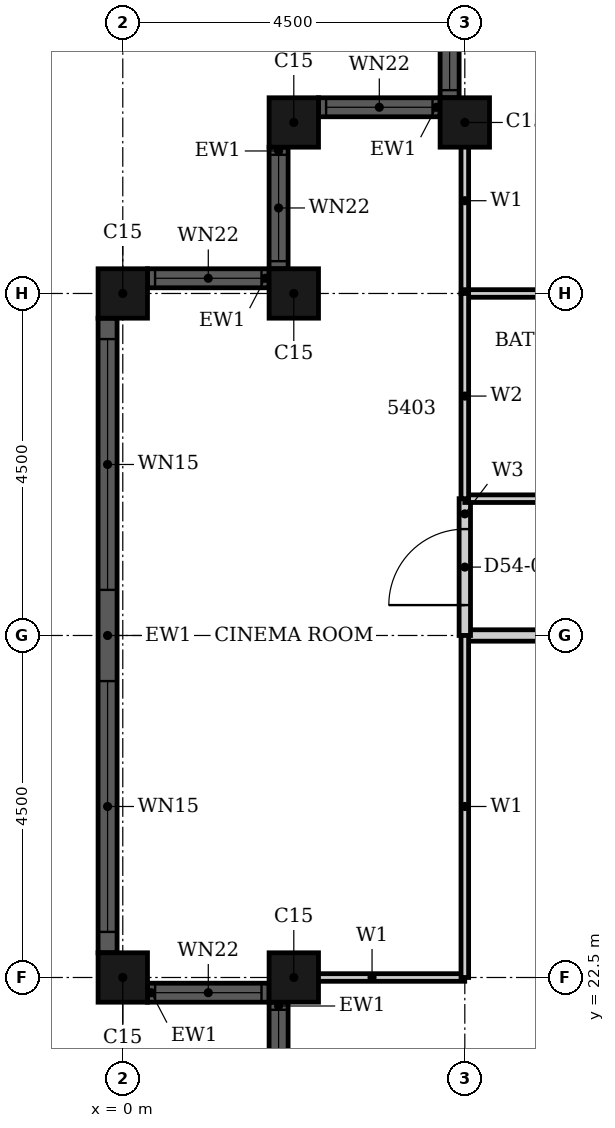
"""IFC4 building model, lengths in metres.
Left out: names, types, materials, properties, quantities, classifications, styles, units other than length and angle.
Written with IfcOpenShell. Run it as: python <this file> out.ifc"""

import sys

from ifc_helpers import new_model, si_unit, direction, frame, frame_2d, origin, origin_2d, place, context, subcontext, project, spatial, rectangle, hollow_rectangle, extrude, element, fill, save


model = new_model("IFC4")
c1 = context("Model", 3, precision=1e-05, world=origin(), true_north=direction((0.0, 1.0)))
c2 = subcontext(c1, "Body", "Model", "MODEL_VIEW")
j1 = project(units=[si_unit("LENGTHUNIT", "METRE"), si_unit("PLANEANGLEUNIT", "RADIAN")], contexts=[c1])
p1 = place(None, origin())
s1 = spatial("IfcSite", under=j1, at=p1, CompositionType="ELEMENT")
p2 = place(p1, origin())
s2 = spatial("IfcBuilding", under=s1, at=p2, CompositionType="ELEMENT")
p3 = place(p2, frame((0.0, 0.0, 214.6)))
s3 = spatial("IfcBuildingStorey", under=s2, at=p3, CompositionType="ELEMENT", Elevation=214.6)
for number, where, z_axis, x_axis in (
    (1, (4.5, 33.75, 0.0), (0.0, 0.0, 1.0), (1.0, 0.0, 0.0)),
    (2, (2.25, 33.75, 0.0), (0.0, 0.0, 1.0), (1.0, 0.0, 0.0)),
    (3, (2.25, 31.5, 0.0), (0.0, 0.0, 1.0), (1.0, 0.0, 0.0)),
    (4, (0.0, 31.5, 0.0), (0.0, 0.0, 1.0), (1.0, 0.0, 0.0)),
    (5, (0.0, 22.5, 0.0), (0.0, 0.0, 1.0), (1.0, 0.0, 0.0)),
    (6, (2.25, 22.5, 0.0), (0.0, 0.0, 1.0), (1.0, 0.0, 0.0)),
):
    element("IfcColumn", number, at=place(p3, frame(where, z_axis=z_axis, x_axis=x_axis)), inside=s3, PredefinedType="COLUMN", context=c2, shape_type="SweptSolid", body=[
        extrude(hollow_rectangle(XDim=0.65, YDim=0.65, WallThickness=0.021, at=origin_2d()), origin(), (0.0, 0.0, 1.0), 3.7),
    ])
p4 = place(p3, frame((4.3, 35.675, 0.0), z_axis=(0.0, 0.0, 1.0), x_axis=(0.0, -1.0, 0.0)))
e7 = element("IfcWall", 7, at=p4, inside=s3, PredefinedType="SOLIDWALL", context=c2, shape_type="SweptSolid", body=[
    extrude(rectangle(XDim=1.6, YDim=0.25, at=frame_2d((0.8, 0.0))), origin(), (0.0, 0.0, 1.0), 3.7),
])
p5 = place(p4, frame((0.1, 0.0, 0.9)))
e8 = element("IfcOpeningElement", 8, at=p5, cuts=e7, PredefinedType="OPENING", context=c2, shape_type="SweptSolid", body=[
    extrude(rectangle(XDim=1.4, YDim=1.85, at=frame_2d((0.7, 0.925))), frame((0.0, 0.135, 0.0), z_axis=(0.0, -1.0, 0.0), x_axis=(1.0, 0.0, 0.0)), (0.0, 0.0, 1.0), 0.27),
])
p6 = place(p3, frame((4.175, 33.95, 0.0), z_axis=(0.0, 0.0, 1.0), x_axis=(-1.0, 0.0, 0.0)))
e9 = element("IfcWall", 9, at=p6, inside=s3, PredefinedType="SOLIDWALL", context=c2, shape_type="SweptSolid", body=[
    extrude(rectangle(XDim=1.6, YDim=0.25, at=frame_2d((0.8, 0.0))), origin(), (0.0, 0.0, 1.0), 3.7),
])
p7 = place(p6, frame((0.1, 0.0, 0.9)))
e10 = element("IfcOpeningElement", 10, at=p7, cuts=e9, PredefinedType="OPENING", context=c2, shape_type="SweptSolid", body=[
    extrude(rectangle(XDim=1.4, YDim=1.85, at=frame_2d((0.7, 0.925))), frame((0.0, 0.135, 0.0), z_axis=(0.0, -1.0, 0.0), x_axis=(1.0, 0.0, 0.0)), (0.0, 0.0, 1.0), 0.27),
])
p8 = place(p3, frame((2.05, 33.425, 0.0), z_axis=(0.0, 0.0, 1.0), x_axis=(0.0, -1.0, 0.0)))
e11 = element("IfcWall", 11, at=p8, inside=s3, PredefinedType="SOLIDWALL", context=c2, shape_type="SweptSolid", body=[
    extrude(rectangle(XDim=1.6, YDim=0.25, at=frame_2d((0.8, 0.0))), origin(), (0.0, 0.0, 1.0), 3.7),
])
p9 = place(p8, frame((0.1, 0.0, 0.9)))
e12 = element("IfcOpeningElement", 12, at=p9, cuts=e11, PredefinedType="OPENING", context=c2, shape_type="SweptSolid", body=[
    extrude(rectangle(XDim=1.4, YDim=1.85, at=frame_2d((0.7, 0.925))), frame((0.0, 0.135, 0.0), z_axis=(0.0, -1.0, 0.0), x_axis=(1.0, 0.0, 0.0)), (0.0, 0.0, 1.0), 0.27),
])
p10 = place(p3, frame((1.925, 31.7, 0.0), z_axis=(0.0, 0.0, 1.0), x_axis=(-1.0, 0.0, 0.0)))
e13 = element("IfcWall", 13, at=p10, inside=s3, PredefinedType="SOLIDWALL", context=c2, shape_type="SweptSolid", body=[
    extrude(rectangle(XDim=1.6, YDim=0.25, at=frame_2d((0.8, 0.0))), origin(), (0.0, 0.0, 1.0), 3.7),
])
p11 = place(p10, frame((0.1, 0.0, 0.9)))
e14 = element("IfcOpeningElement", 14, at=p11, cuts=e13, PredefinedType="OPENING", context=c2, shape_type="SweptSolid", body=[
    extrude(rectangle(XDim=1.4, YDim=1.85, at=frame_2d((0.7, 0.925))), frame((0.0, 0.135, 0.0), z_axis=(0.0, -1.0, 0.0), x_axis=(1.0, 0.0, 0.0)), (0.0, 0.0, 1.0), 0.27),
])
p12 = place(p3, frame((-0.2, 31.175, 0.0), z_axis=(0.0, 0.0, 1.0), x_axis=(0.0, -1.0, 0.0)))
e15 = element("IfcWall", 15, at=p12, inside=s3, PredefinedType="SOLIDWALL", context=c2, shape_type="SweptSolid", body=[
    extrude(rectangle(XDim=8.35, YDim=0.25, at=frame_2d((4.175, 0.0))), origin(), (0.0, 0.0, 1.0), 3.7),
])
p13 = place(p12, frame((0.275, 0.0, 0.45)))
e16 = element("IfcOpeningElement", 16, at=p13, cuts=e15, PredefinedType="OPENING", context=c2, shape_type="SweptSolid", body=[
    extrude(rectangle(XDim=3.3, YDim=2.3, at=frame_2d((1.65, 1.15))), frame((0.0, 0.135, 0.0), z_axis=(0.0, -1.0, 0.0), x_axis=(1.0, 0.0, 0.0)), (0.0, 0.0, 1.0), 0.27),
])
p14 = place(p12, frame((4.775, 0.0, 0.45)))
e17 = element("IfcOpeningElement", 17, at=p14, cuts=e15, PredefinedType="OPENING", context=c2, shape_type="SweptSolid", body=[
    extrude(rectangle(XDim=3.3, YDim=2.3, at=frame_2d((1.65, 1.15))), frame((0.0, 0.135, 0.0), z_axis=(0.0, -1.0, 0.0), x_axis=(1.0, 0.0, 0.0)), (0.0, 0.0, 1.0), 0.27),
])
p15 = place(p3, frame((0.325, 22.3, 0.0), z_axis=(0.0, 0.0, 1.0), x_axis=(1.0, 0.0, 0.0)))
e18 = element("IfcWall", 18, at=p15, inside=s3, PredefinedType="SOLIDWALL", context=c2, shape_type="SweptSolid", body=[
    extrude(rectangle(XDim=1.6, YDim=0.25, at=frame_2d((0.8, 0.0))), origin(), (0.0, 0.0, 1.0), 3.7),
])
p16 = place(p15, frame((0.1, 0.0, 0.9)))
e19 = element("IfcOpeningElement", 19, at=p16, cuts=e18, PredefinedType="OPENING", context=c2, shape_type="SweptSolid", body=[
    extrude(rectangle(XDim=1.4, YDim=1.85, at=frame_2d((0.7, 0.925))), frame((0.0, 0.135, 0.0), z_axis=(0.0, -1.0, 0.0), x_axis=(1.0, 0.0, 0.0)), (0.0, 0.0, 1.0), 0.27),
])
p17 = place(p3, frame((2.05, 22.175, 0.0), z_axis=(0.0, 0.0, 1.0), x_axis=(0.0, -1.0, 0.0)))
e20 = element("IfcWall", 20, at=p17, inside=s3, PredefinedType="SOLIDWALL", context=c2, shape_type="SweptSolid", body=[
    extrude(rectangle(XDim=1.6, YDim=0.25, at=frame_2d((0.8, 0.0))), origin(), (0.0, 0.0, 1.0), 3.7),
])
p18 = place(p17, frame((0.1, 0.0, 0.9)))
e21 = element("IfcOpeningElement", 21, at=p18, cuts=e20, PredefinedType="OPENING", context=c2, shape_type="SweptSolid", body=[
    extrude(rectangle(XDim=1.4, YDim=1.85, at=frame_2d((0.7, 0.925))), frame((0.0, 0.135, 0.0), z_axis=(0.0, -1.0, 0.0), x_axis=(1.0, 0.0, 0.0)), (0.0, 0.0, 1.0), 0.27),
])
p19 = place(p3, frame((4.5, 27.0, 0.0), z_axis=(0.0, 0.0, 1.0), x_axis=(1.0, 0.0, 0.0)))
e22 = element("IfcWall", 22, at=p19, inside=s3, PredefinedType="PARTITIONING", context=c2, shape_type="SweptSolid", body=[
    extrude(rectangle(XDim=13.5, YDim=0.15, at=frame_2d((6.75, 0.0))), origin(), (0.0, 0.0, 1.0), 2.68),
])
p20 = place(p19, frame((5.35, 0.0, 0.0)))
e23 = element("IfcOpeningElement", 23, at=p20, cuts=e22, PredefinedType="OPENING", context=c2, shape_type="SweptSolid", body=[
    extrude(rectangle(XDim=1.0, YDim=2.1, at=frame_2d((0.5, 1.05))), frame((0.0, 0.085, 0.0), z_axis=(0.0, -1.0, 0.0), x_axis=(1.0, 0.0, 0.0)), (0.0, 0.0, 1.0), 0.17),
])
p21 = place(p3, frame((4.5, 27.0, 0.0), z_axis=(0.0, 0.0, 1.0), x_axis=(0.0, 1.0, 0.0)))
e24 = element("IfcWall", 24, at=p21, inside=s3, PredefinedType="PARTITIONING", context=c2, shape_type="SweptSolid", body=[
    extrude(rectangle(XDim=1.8, YDim=0.15, at=frame_2d((0.9, 0.0))), origin(), (0.0, 0.0, 1.0), 3.4),
])
p22 = place(p21, frame((0.4, 0.0, 0.0)))
e25 = element("IfcOpeningElement", 25, at=p22, cuts=e24, PredefinedType="OPENING", context=c2, shape_type="SweptSolid", body=[
    extrude(rectangle(XDim=1.0, YDim=2.1, at=frame_2d((0.5, 1.05))), frame((0.0, 0.085, 0.0), z_axis=(0.0, -1.0, 0.0), x_axis=(1.0, 0.0, 0.0)), (0.0, 0.0, 1.0), 0.17),
])
p23 = place(p3, frame((2.06, 22.5, 0.0), z_axis=(0.0, 0.0, 1.0), x_axis=(1.0, 0.0, 0.0)))
e26 = element("IfcWall", 26, at=p23, inside=s3, PredefinedType="PARTITIONING", context=c2, shape_type="SweptSolid", body=[
    extrude(rectangle(XDim=2.439, YDim=0.1, at=frame_2d((1.219, 0.0))), origin(), (0.0, 0.0, 1.0), 2.68),
])
p24 = place(p3, frame((4.5, 31.501, 0.0), z_axis=(0.0, 0.0, 1.0), x_axis=(0.0, 1.0, 0.0)))
e27 = element("IfcWall", 27, at=p24, inside=s3, PredefinedType="PARTITIONING", context=c2, shape_type="SweptSolid", body=[
    extrude(rectangle(XDim=2.439, YDim=0.1, at=frame_2d((1.219, 0.0))), origin(), (0.0, 0.0, 1.0), 3.4),
])
p25 = place(p3, frame((4.5, 22.5, 0.0), z_axis=(0.0, 0.0, 1.0), x_axis=(0.0, 1.0, 0.0)))
e28 = element("IfcWall", 28, at=p25, inside=s3, PredefinedType="PARTITIONING", context=c2, shape_type="SweptSolid", body=[
    extrude(rectangle(XDim=4.5, YDim=0.1, at=frame_2d((2.25, 0.0))), origin(), (0.0, 0.0, 1.0), 3.4),
])
p26 = place(p3, frame((4.5, 28.8, 0.0), z_axis=(0.0, 0.0, 1.0), x_axis=(1.0, 0.0, 0.0)))
e29 = element("IfcWall", 29, at=p26, inside=s3, PredefinedType="PARTITIONING", context=c2, shape_type="SweptSolid", body=[
    extrude(rectangle(XDim=2.4, YDim=0.1, at=frame_2d((1.2, 0.0))), origin(), (0.0, 0.0, 1.0), 3.4),
])
p27 = place(p3, frame((4.5, 31.5, 0.0), z_axis=(0.0, 0.0, 1.0), x_axis=(1.0, 0.0, 0.0)))
e30 = element("IfcWall", 30, at=p27, inside=s3, PredefinedType="PARTITIONING", context=c2, shape_type="SweptSolid", body=[
    extrude(rectangle(XDim=2.4, YDim=0.1, at=frame_2d((1.2, 0.0))), origin(), (0.0, 0.0, 1.0), 2.68),
])
p28 = place(p3, frame((4.5, 28.8, 0.0), z_axis=(0.0, 0.0, 1.0), x_axis=(0.0, 1.0, 0.0)))
e31 = element("IfcWall", 31, at=p28, inside=s3, PredefinedType="PARTITIONING", context=c2, shape_type="SweptSolid", body=[
    extrude(rectangle(XDim=2.7, YDim=0.1, at=frame_2d((1.35, 0.0))), origin(), (0.0, 0.0, 1.0), 3.4),
])
p29 = place(p5, origin())
e32 = element("IfcWindow", 32, at=p29, inside=s3, PartitioningType="SINGLE_PANEL", PredefinedType="WINDOW", context=c2, shape_type="SweptSolid", body=[
    extrude(rectangle(XDim=1.4, YDim=1.85, at=frame_2d((0.7, 0.925))), frame((0.0, 0.03, 0.0), z_axis=(0.0, -1.0, 0.0), x_axis=(1.0, 0.0, 0.0)), (0.0, 0.0, 1.0), 0.06),
])
fill(e8, e32)
p30 = place(p7, origin())
e33 = element("IfcWindow", 33, at=p30, inside=s3, PartitioningType="SINGLE_PANEL", PredefinedType="WINDOW", context=c2, shape_type="SweptSolid", body=[
    extrude(rectangle(XDim=1.4, YDim=1.85, at=frame_2d((0.7, 0.925))), frame((0.0, 0.03, 0.0), z_axis=(0.0, -1.0, 0.0), x_axis=(1.0, 0.0, 0.0)), (0.0, 0.0, 1.0), 0.06),
])
fill(e10, e33)
p31 = place(p9, origin())
e34 = element("IfcWindow", 34, at=p31, inside=s3, PartitioningType="SINGLE_PANEL", PredefinedType="WINDOW", context=c2, shape_type="SweptSolid", body=[
    extrude(rectangle(XDim=1.4, YDim=1.85, at=frame_2d((0.7, 0.925))), frame((0.0, 0.03, 0.0), z_axis=(0.0, -1.0, 0.0), x_axis=(1.0, 0.0, 0.0)), (0.0, 0.0, 1.0), 0.06),
])
fill(e12, e34)
p32 = place(p11, origin())
e35 = element("IfcWindow", 35, at=p32, inside=s3, PartitioningType="SINGLE_PANEL", PredefinedType="WINDOW", context=c2, shape_type="SweptSolid", body=[
    extrude(rectangle(XDim=1.4, YDim=1.85, at=frame_2d((0.7, 0.925))), frame((0.0, 0.03, 0.0), z_axis=(0.0, -1.0, 0.0), x_axis=(1.0, 0.0, 0.0)), (0.0, 0.0, 1.0), 0.06),
])
fill(e14, e35)
p33 = place(p13, origin())
e36 = element("IfcWindow", 36, at=p33, inside=s3, PartitioningType="SINGLE_PANEL", PredefinedType="WINDOW", context=c2, shape_type="SweptSolid", body=[
    extrude(rectangle(XDim=3.3, YDim=2.3, at=frame_2d((1.65, 1.15))), frame((0.0, 0.03, 0.0), z_axis=(0.0, -1.0, 0.0), x_axis=(1.0, 0.0, 0.0)), (0.0, 0.0, 1.0), 0.06),
])
fill(e16, e36)
p34 = place(p14, origin())
e37 = element("IfcWindow", 37, at=p34, inside=s3, PartitioningType="SINGLE_PANEL", PredefinedType="WINDOW", context=c2, shape_type="SweptSolid", body=[
    extrude(rectangle(XDim=3.3, YDim=2.3, at=frame_2d((1.65, 1.15))), frame((0.0, 0.03, 0.0), z_axis=(0.0, -1.0, 0.0), x_axis=(1.0, 0.0, 0.0)), (0.0, 0.0, 1.0), 0.06),
])
fill(e17, e37)
p35 = place(p16, origin())
e38 = element("IfcWindow", 38, at=p35, inside=s3, PartitioningType="SINGLE_PANEL", PredefinedType="WINDOW", context=c2, shape_type="SweptSolid", body=[
    extrude(rectangle(XDim=1.4, YDim=1.85, at=frame_2d((0.7, 0.925))), frame((0.0, 0.03, 0.0), z_axis=(0.0, -1.0, 0.0), x_axis=(1.0, 0.0, 0.0)), (0.0, 0.0, 1.0), 0.06),
])
fill(e19, e38)
p36 = place(p18, origin())
e39 = element("IfcWindow", 39, at=p36, inside=s3, PartitioningType="SINGLE_PANEL", PredefinedType="WINDOW", context=c2, shape_type="SweptSolid", body=[
    extrude(rectangle(XDim=1.4, YDim=1.85, at=frame_2d((0.7, 0.925))), frame((0.0, 0.03, 0.0), z_axis=(0.0, -1.0, 0.0), x_axis=(1.0, 0.0, 0.0)), (0.0, 0.0, 1.0), 0.06),
])
fill(e21, e39)
p37 = place(p22, origin())
e40 = element("IfcDoor", 40, at=p37, inside=s3, OperationType="SINGLE_SWING_LEFT", PredefinedType="DOOR", context=c2, shape_type="SweptSolid", body=[
    extrude(rectangle(XDim=1.0, YDim=2.1, at=frame_2d((0.5, 1.05))), frame((0.0, 0.025, 0.0), z_axis=(0.0, -1.0, 0.0), x_axis=(1.0, 0.0, 0.0)), (0.0, 0.0, 1.0), 0.05),
])
fill(e25, e40)
save(model, sys.argv[1])
